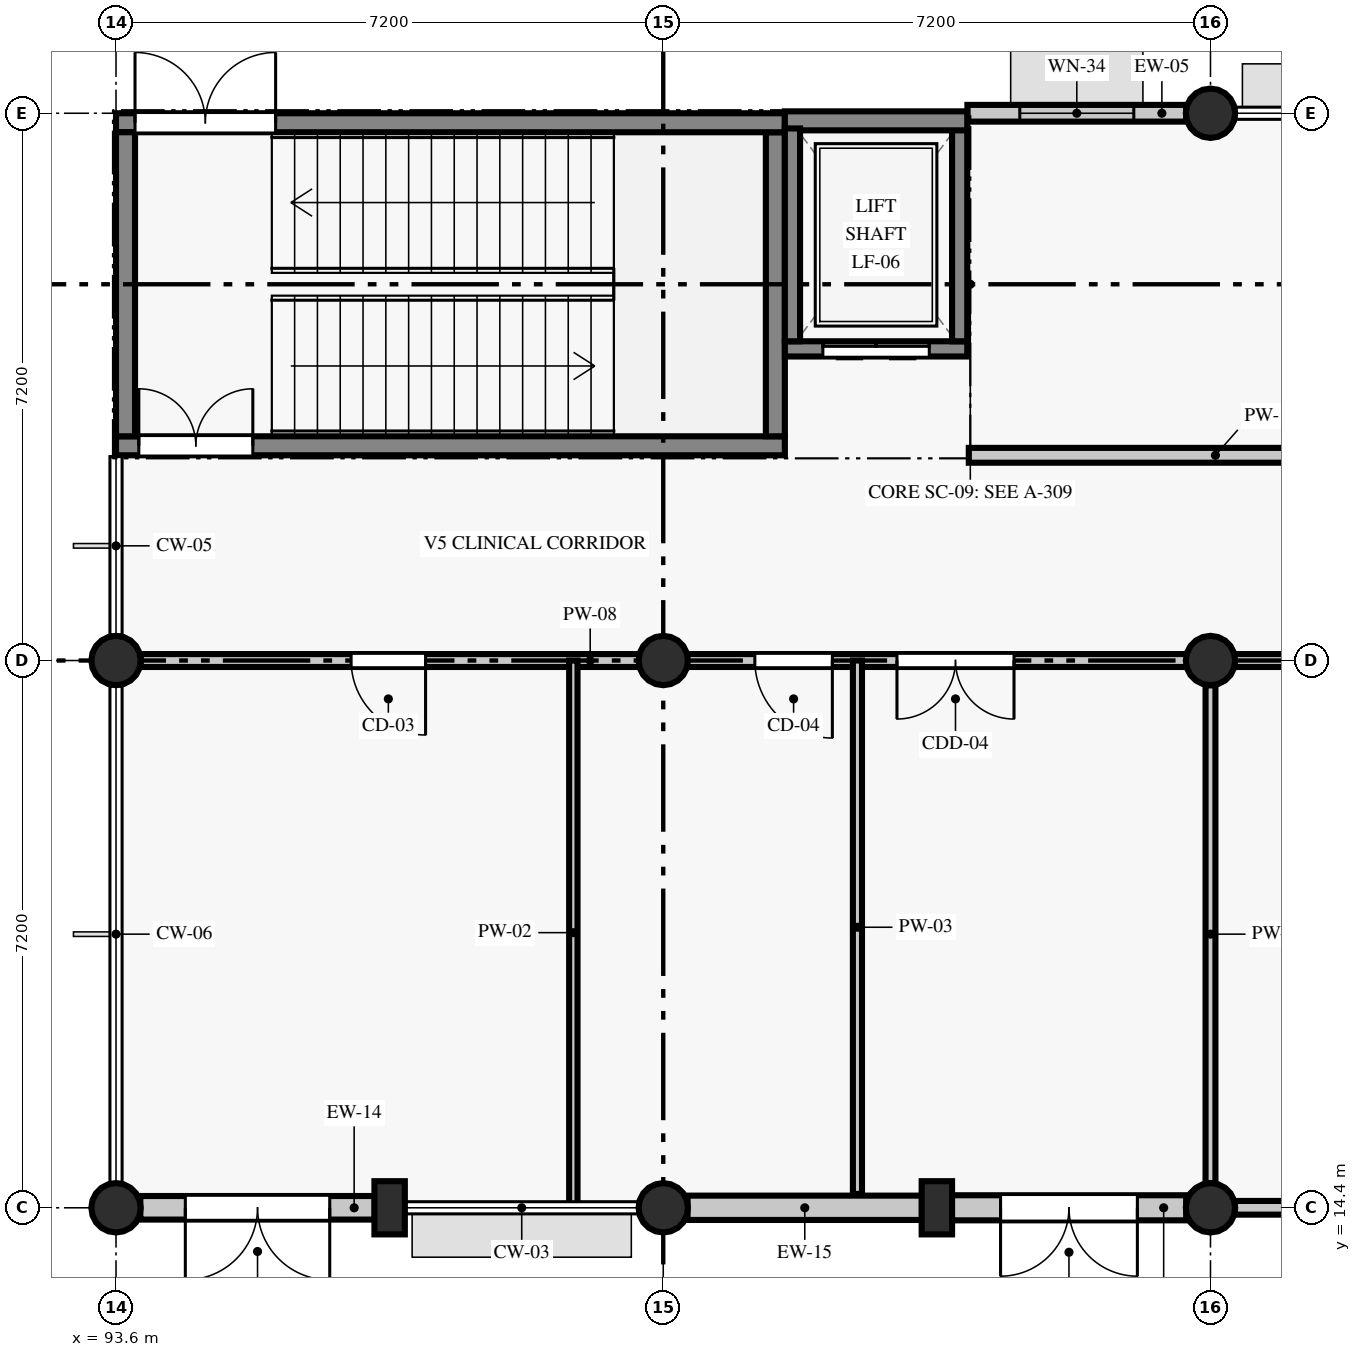
"""IFC4 building model, lengths in metres.
Left out: names, types, materials, properties, quantities, classifications, styles, units other than length and angle.
Written with IfcOpenShell. Run it as: python <this file> out.ifc"""

import sys

from ifc_helpers import new_model, si_unit, direction, frame, frame_2d, origin, origin_2d, place, context, subcontext, project, spatial, rectangle, circle, extrude, element, fill, save


model = new_model("IFC4")
c1 = context("Model", 3, precision=1e-05, world=origin(), true_north=direction((0.0, 1.0)))
c2 = subcontext(c1, "Body", "Model", "MODEL_VIEW")
j1 = project(units=[si_unit("LENGTHUNIT", "METRE"), si_unit("PLANEANGLEUNIT", "RADIAN")], contexts=[c1])
p1 = place(None, origin())
s1 = spatial("IfcSite", under=j1, at=p1, CompositionType="ELEMENT")
p2 = place(p1, origin())
s2 = spatial("IfcBuilding", under=s1, at=p2, CompositionType="ELEMENT")
p3 = place(p2, origin())
s3 = spatial("IfcBuildingStorey", under=s2, at=p3, CompositionType="ELEMENT", Elevation=0.0)
for number, where, z_axis, x_axis in (
    (1, (93.6, 14.4, 0.0), (0.0, 0.0, 1.0), (1.0, 0.0, 0.0)),
    (2, (93.6, 21.6, 0.0), (0.0, 0.0, 1.0), (1.0, 0.0, 0.0)),
    (3, (100.8, 14.4, 0.0), (0.0, 0.0, 1.0), (1.0, 0.0, 0.0)),
    (4, (100.8, 21.6, 0.0), (0.0, 0.0, 1.0), (1.0, 0.0, 0.0)),
    (5, (108.0, 14.4, 0.0), (0.0, 0.0, 1.0), (1.0, 0.0, 0.0)),
    (6, (108.0, 21.6, 0.0), (0.0, 0.0, 1.0), (1.0, 0.0, 0.0)),
    (7, (108.0, 28.8, 0.0), (0.0, 0.0, 1.0), (1.0, 0.0, 0.0)),
):
    element("IfcColumn", number, at=place(p3, frame(where, z_axis=z_axis, x_axis=x_axis)), inside=s3, PredefinedType="COLUMN", context=c2, shape_type="SweptSolid", body=[
        extrude(circle(Radius=0.325, at=origin_2d()), origin(), (0.0, 0.0, 1.0), 4.495),
    ])
for number, where, z_axis, x_axis in (
    (8, (97.2, 14.4, 0.0), (0.0, 0.0, 1.0), (1.0, 0.0, 0.0)),
    (9, (104.4, 14.4, 0.0), (0.0, 0.0, 1.0), (1.0, 0.0, 0.0)),
):
    element("IfcColumn", number, at=place(p3, frame(where, z_axis=z_axis, x_axis=x_axis)), inside=s3, PredefinedType="PILASTER", context=c2, shape_type="SweptSolid", body=[
        extrude(rectangle(XDim=0.4, YDim=0.7, at=origin_2d()), origin(), (0.0, 0.0, 1.0), 4.495),
    ])
p4 = place(p3, frame((93.92, 14.4, 0.0), z_axis=(0.0, 0.0, 1.0), x_axis=(1.0, 0.0, 0.0)))
e10 = element("IfcWall", 10, at=p4, inside=s3, PredefinedType="STANDARD", context=c2, shape_type="SweptSolid", body=[
    extrude(rectangle(XDim=3.084, YDim=0.31, at=frame_2d((1.542, 0.0))), origin(), (0.0, 0.0, 1.0), 2.9),
])
p5 = place(p4, frame((0.592, 0.0, 0.0)))
e11 = element("IfcOpeningElement", 11, at=p5, cuts=e10, PredefinedType="OPENING", context=c2, shape_type="SweptSolid", body=[
    extrude(rectangle(XDim=1.9, YDim=2.28, at=frame_2d((0.95, 1.14))), frame((0.0, 0.165, 0.0), z_axis=(0.0, -1.0, 0.0), x_axis=(1.0, 0.0, 0.0)), (0.0, 0.0, 1.0), 0.33),
])
p6 = place(p3, frame((101.12, 14.4, 0.0), z_axis=(0.0, 0.0, 1.0), x_axis=(1.0, 0.0, 0.0)))
e12 = element("IfcWall", 12, at=p6, inside=s3, PredefinedType="STANDARD", context=c2, shape_type="SweptSolid", body=[
    extrude(rectangle(XDim=3.084, YDim=0.32, at=frame_2d((1.542, 0.0))), origin(), (0.0, 0.0, 1.0), 2.9),
])
p7 = place(p3, frame((104.596, 14.4, 0.0), z_axis=(0.0, 0.0, 1.0), x_axis=(1.0, 0.0, 0.0)))
e13 = element("IfcWall", 13, at=p7, inside=s3, PredefinedType="STANDARD", context=c2, shape_type="SweptSolid", body=[
    extrude(rectangle(XDim=3.084, YDim=0.33, at=frame_2d((1.542, 0.0))), origin(), (0.0, 0.0, 1.0), 2.9),
])
p8 = place(p7, frame((0.642, 0.0, 0.0)))
e14 = element("IfcOpeningElement", 14, at=p8, cuts=e13, PredefinedType="OPENING", context=c2, shape_type="SweptSolid", body=[
    extrude(rectangle(XDim=1.8, YDim=2.25, at=frame_2d((0.9, 1.125))), frame((0.0, 0.175, 0.0), z_axis=(0.0, -1.0, 0.0), x_axis=(1.0, 0.0, 0.0)), (0.0, 0.0, 1.0), 0.35),
])
p9 = place(p3, frame((108.32, 14.4, 0.0), z_axis=(0.0, 0.0, 1.0), x_axis=(1.0, 0.0, 0.0)))
e15 = element("IfcWall", 15, at=p9, inside=s3, PredefinedType="STANDARD", context=c2, shape_type="SweptSolid", body=[
    extrude(rectangle(XDim=3.084, YDim=0.18, at=frame_2d((1.542, 0.0))), origin(), (0.0, 0.0, 1.0), 2.9),
])
p10 = place(p9, frame((0.667, 0.0, 0.0)))
e16 = element("IfcOpeningElement", 16, at=p10, cuts=e15, PredefinedType="OPENING", context=c2, shape_type="SweptSolid", body=[
    extrude(rectangle(XDim=1.75, YDim=2.22, at=frame_2d((0.875, 1.11))), frame((0.0, 0.1, 0.0), z_axis=(0.0, -1.0, 0.0), x_axis=(1.0, 0.0, 0.0)), (0.0, 0.0, 1.0), 0.2),
])
p11 = place(p3, frame((107.68, 28.8, 0.0), z_axis=(0.0, 0.0, 1.0), x_axis=(-1.0, 0.0, 0.0)))
e17 = element("IfcWall", 17, at=p11, inside=s3, PredefinedType="STANDARD", context=c2, shape_type="SweptSolid", body=[
    extrude(rectangle(XDim=2.878, YDim=0.22, at=frame_2d((1.439, 0.0))), origin(), (0.0, 0.0, 1.0), 4.495),
])
p12 = place(p11, frame((0.689, 0.0, 0.9)))
e18 = element("IfcOpeningElement", 18, at=p12, cuts=e17, PredefinedType="OPENING", context=c2, shape_type="SweptSolid", body=[
    extrude(rectangle(XDim=1.5, YDim=1.66, at=frame_2d((0.75, 0.83))), frame((0.0, 0.12, 0.0), z_axis=(0.0, -1.0, 0.0), x_axis=(1.0, 0.0, 0.0)), (0.0, 0.0, 1.0), 0.24),
])
p13 = place(p3, frame((93.6, 24.425, 0.0), z_axis=(0.0, 0.0, 1.0), x_axis=(1.0, 0.0, 0.0)))
e19 = element("IfcWall", 19, at=p13, inside=s3, PredefinedType="SHEAR", context=c2, shape_type="SweptSolid", body=[
    extrude(rectangle(XDim=8.8, YDim=0.25, at=frame_2d((4.4, 0.0))), origin(), (0.0, 0.0, 1.0), 4.495),
])
p14 = place(p13, frame((0.3, 0.0, 0.0)))
e20 = element("IfcOpeningElement", 20, at=p14, cuts=e19, PredefinedType="OPENING", context=c2, shape_type="SweptSolid", body=[
    extrude(rectangle(XDim=1.5, YDim=2.15, at=frame_2d((0.75, 1.075))), frame((0.0, 0.135, 0.0), z_axis=(0.0, -1.0, 0.0), x_axis=(1.0, 0.0, 0.0)), (0.0, 0.0, 1.0), 0.27),
])
p15 = place(p3, frame((102.275, 24.55, 0.0), z_axis=(0.0, 0.0, 1.0), x_axis=(0.0, 1.0, 0.0)))
e21 = element("IfcWall", 21, at=p15, inside=s3, PredefinedType="SHEAR", context=c2, shape_type="SweptSolid", body=[
    extrude(rectangle(XDim=4.0, YDim=0.25, at=frame_2d((2.0, 0.0))), origin(), (0.0, 0.0, 1.0), 4.495),
])
p16 = place(p3, frame((102.4, 28.675, 0.0), z_axis=(0.0, 0.0, 1.0), x_axis=(-1.0, 0.0, 0.0)))
e22 = element("IfcWall", 22, at=p16, inside=s3, PredefinedType="SHEAR", context=c2, shape_type="SweptSolid", body=[
    extrude(rectangle(XDim=8.8, YDim=0.25, at=frame_2d((4.4, 0.0))), origin(), (0.0, 0.0, 1.0), 4.495),
])
p17 = place(p16, frame((6.7, 0.0, 0.0)))
e23 = element("IfcOpeningElement", 23, at=p17, cuts=e22, PredefinedType="OPENING", context=c2, shape_type="SweptSolid", body=[
    extrude(rectangle(XDim=1.85, YDim=2.2, at=frame_2d((0.925, 1.1))), frame((0.0, 0.135, 0.0), z_axis=(0.0, -1.0, 0.0), x_axis=(1.0, 0.0, 0.0)), (0.0, 0.0, 1.0), 0.27),
])
p18 = place(p3, frame((93.725, 28.55, 0.0), z_axis=(0.0, 0.0, 1.0), x_axis=(0.0, -1.0, 0.0)))
e24 = element("IfcWall", 24, at=p18, inside=s3, PredefinedType="SHEAR", context=c2, shape_type="SweptSolid", body=[
    extrude(rectangle(XDim=4.0, YDim=0.25, at=frame_2d((2.0, 0.0))), origin(), (0.0, 0.0, 1.0), 4.495),
])
p19 = place(p3, frame((102.4, 25.7, 0.0), z_axis=(0.0, 0.0, 1.0), x_axis=(1.0, 0.0, 0.0)))
e25 = element("IfcWall", 25, at=p19, inside=s3, PredefinedType="SHEAR", context=c2, shape_type="SweptSolid", body=[
    extrude(rectangle(XDim=2.4, YDim=0.2, at=frame_2d((1.2, 0.0))), origin(), (0.0, 0.0, 1.0), 4.495),
])
p20 = place(p19, frame((0.5, 0.0, 0.0)))
e26 = element("IfcOpeningElement", 26, at=p20, cuts=e25, PredefinedType="OPENING", context=c2, shape_type="SweptSolid", body=[
    extrude(rectangle(XDim=1.4, YDim=2.15, at=frame_2d((0.7, 1.075))), frame((0.0, 0.11, 0.0), z_axis=(0.0, -1.0, 0.0), x_axis=(1.0, 0.0, 0.0)), (0.0, 0.0, 1.0), 0.22),
])
p21 = place(p3, frame((104.7, 25.8, 0.0), z_axis=(0.0, 0.0, 1.0), x_axis=(0.0, 1.0, 0.0)))
e27 = element("IfcWall", 27, at=p21, inside=s3, PredefinedType="SHEAR", context=c2, shape_type="SweptSolid", body=[
    extrude(rectangle(XDim=2.8, YDim=0.2, at=frame_2d((1.4, 0.0))), origin(), (0.0, 0.0, 1.0), 4.495),
])
p22 = place(p3, frame((104.8, 28.7, 0.0), z_axis=(0.0, 0.0, 1.0), x_axis=(-1.0, 0.0, 0.0)))
e28 = element("IfcWall", 28, at=p22, inside=s3, PredefinedType="SHEAR", context=c2, shape_type="SweptSolid", body=[
    extrude(rectangle(XDim=2.4, YDim=0.25, at=frame_2d((1.2, 0.0))), origin(), (0.0, 0.0, 1.0), 4.495),
])
p23 = place(p3, frame((102.5, 28.6, 0.0), z_axis=(0.0, 0.0, 1.0), x_axis=(0.0, -1.0, 0.0)))
e29 = element("IfcWall", 29, at=p23, inside=s3, PredefinedType="SHEAR", context=c2, shape_type="SweptSolid", body=[
    extrude(rectangle(XDim=2.8, YDim=0.2, at=frame_2d((1.4, 0.0))), origin(), (0.0, 0.0, 1.0), 4.495),
])
p24 = place(p3, frame((93.925, 21.6, 0.0), z_axis=(0.0, 0.0, 1.0), x_axis=(1.0, 0.0, 0.0)))
e30 = element("IfcWall", 30, at=p24, inside=s3, PredefinedType="PARTITIONING", context=c2, shape_type="SweptSolid", body=[
    extrude(rectangle(XDim=28.15, YDim=0.17, at=frame_2d((14.075, 0.0))), origin(), (0.0, 0.0, 1.0), 3.795),
])
p25 = place(p24, frame((2.768, 0.0, 0.0)))
e31 = element("IfcOpeningElement", 31, at=p25, cuts=e30, PredefinedType="OPENING", context=c2, shape_type="SweptSolid", body=[
    extrude(rectangle(XDim=0.98, YDim=2.08, at=frame_2d((0.49, 1.04))), frame((0.0, 0.095, 0.0), z_axis=(0.0, -1.0, 0.0), x_axis=(1.0, 0.0, 0.0)), (0.0, 0.0, 1.0), 0.19),
])
p26 = place(p24, frame((8.08, 0.0, 0.0)))
e32 = element("IfcOpeningElement", 32, at=p26, cuts=e30, PredefinedType="OPENING", context=c2, shape_type="SweptSolid", body=[
    extrude(rectangle(XDim=1.02, YDim=2.08, at=frame_2d((0.51, 1.04))), frame((0.0, 0.095, 0.0), z_axis=(0.0, -1.0, 0.0), x_axis=(1.0, 0.0, 0.0)), (0.0, 0.0, 1.0), 0.19),
])
p27 = place(p24, frame((9.95, 0.0, 0.0)))
e33 = element("IfcOpeningElement", 33, at=p27, cuts=e30, PredefinedType="OPENING", context=c2, shape_type="SweptSolid", body=[
    extrude(rectangle(XDim=1.54, YDim=2.2, at=frame_2d((0.77, 1.1))), frame((0.0, 0.095, 0.0), z_axis=(0.0, -1.0, 0.0), x_axis=(1.0, 0.0, 0.0)), (0.0, 0.0, 1.0), 0.19),
])
p28 = place(p24, frame((15.055, 0.0, 0.0)))
e34 = element("IfcOpeningElement", 34, at=p28, cuts=e30, PredefinedType="OPENING", context=c2, shape_type="SweptSolid", body=[
    extrude(rectangle(XDim=0.92, YDim=2.18, at=frame_2d((0.46, 1.09))), frame((0.0, 0.095, 0.0), z_axis=(0.0, -1.0, 0.0), x_axis=(1.0, 0.0, 0.0)), (0.0, 0.0, 1.0), 0.19),
])
p29 = place(p24, frame((17.255, 0.0, 0.0)))
e35 = element("IfcOpeningElement", 35, at=p29, cuts=e30, PredefinedType="OPENING", context=c2, shape_type="SweptSolid", body=[
    extrude(rectangle(XDim=0.94, YDim=2.08, at=frame_2d((0.47, 1.04))), frame((0.0, 0.095, 0.0), z_axis=(0.0, -1.0, 0.0), x_axis=(1.0, 0.0, 0.0)), (0.0, 0.0, 1.0), 0.19),
])
p30 = place(p24, frame((19.545, 0.0, 0.0)))
e36 = element("IfcOpeningElement", 36, at=p30, cuts=e30, PredefinedType="OPENING", context=c2, shape_type="SweptSolid", body=[
    extrude(rectangle(XDim=0.9, YDim=2.08, at=frame_2d((0.45, 1.04))), frame((0.0, 0.095, 0.0), z_axis=(0.0, -1.0, 0.0), x_axis=(1.0, 0.0, 0.0)), (0.0, 0.0, 1.0), 0.19),
])
p31 = place(p24, frame((23.11, 0.0, 0.0)))
e37 = element("IfcOpeningElement", 37, at=p31, cuts=e30, PredefinedType="OPENING", context=c2, shape_type="SweptSolid", body=[
    extrude(rectangle(XDim=0.95, YDim=2.13, at=frame_2d((0.475, 1.065))), frame((0.0, 0.095, 0.0), z_axis=(0.0, -1.0, 0.0), x_axis=(1.0, 0.0, 0.0)), (0.0, 0.0, 1.0), 0.19),
])
p32 = place(p24, frame((24.765, 0.0, 0.0)))
e38 = element("IfcOpeningElement", 38, at=p32, cuts=e30, PredefinedType="OPENING", context=c2, shape_type="SweptSolid", body=[
    extrude(rectangle(XDim=1.0, YDim=2.13, at=frame_2d((0.5, 1.065))), frame((0.0, 0.095, 0.0), z_axis=(0.0, -1.0, 0.0), x_axis=(1.0, 0.0, 0.0)), (0.0, 0.0, 1.0), 0.19),
])
p33 = place(p3, frame((99.617, 14.44, 0.0), z_axis=(0.0, 0.0, 1.0), x_axis=(0.0, 1.0, 0.0)))
e39 = element("IfcWall", 39, at=p33, inside=s3, PredefinedType="PARTITIONING", context=c2, shape_type="SweptSolid", body=[
    extrude(rectangle(XDim=7.16, YDim=0.11, at=frame_2d((3.58, 0.0))), origin(), (0.0, 0.0, 1.0), 3.795),
])
p34 = place(p3, frame((103.355, 14.582, 0.0), z_axis=(0.0, 0.0, 1.0), x_axis=(0.0, 1.0, 0.0)))
e40 = element("IfcWall", 40, at=p34, inside=s3, PredefinedType="PARTITIONING", context=c2, shape_type="SweptSolid", body=[
    extrude(rectangle(XDim=7.018, YDim=0.12, at=frame_2d((3.509, 0.0))), origin(), (0.0, 0.0, 1.0), 3.795),
])
p35 = place(p3, frame((108.0, 14.725, 0.0), z_axis=(0.0, 0.0, 1.0), x_axis=(0.0, 1.0, 0.0)))
e41 = element("IfcWall", 41, at=p35, inside=s3, PredefinedType="PARTITIONING", context=c2, shape_type="SweptSolid", body=[
    extrude(rectangle(XDim=6.55, YDim=0.13, at=frame_2d((3.275, 0.0))), origin(), (0.0, 0.0, 1.0), 3.945),
])
p36 = place(p3, frame((104.82, 24.3, 0.0), z_axis=(0.0, 0.0, 1.0), x_axis=(1.0, 0.0, 0.0)))
e42 = element("IfcWall", 42, at=p36, inside=s3, PredefinedType="PARTITIONING", context=c2, shape_type="SweptSolid", body=[
    extrude(rectangle(XDim=8.76, YDim=0.195, at=frame_2d((4.38, 0.0))), origin(), (0.0, 0.0, 1.0), 3.945),
])
p37 = place(p36, frame((6.54, 0.0, 0.0)))
e43 = element("IfcOpeningElement", 43, at=p37, cuts=e42, PredefinedType="OPENING", context=c2, shape_type="SweptSolid", body=[
    extrude(rectangle(XDim=1.05, YDim=2.13, at=frame_2d((0.525, 1.065))), frame((0.0, 0.107, 0.0), z_axis=(0.0, -1.0, 0.0), x_axis=(1.0, 0.0, 0.0)), (0.0, 0.0, 1.0), 0.215),
])
p38 = place(p5, frame((1.9, 0.0, 0.0), z_axis=(0.0, 0.0, 1.0), x_axis=(-1.0, 0.0, 0.0)))
e44 = element("IfcDoor", 44, at=p38, inside=s3, OperationType="DOUBLE_DOOR_SINGLE_SWING", PredefinedType="DOOR", context=c2, shape_type="SweptSolid", body=[
    extrude(rectangle(XDim=1.9, YDim=2.28, at=frame_2d((0.95, 1.14))), frame((0.0, 0.025, 0.0), z_axis=(0.0, -1.0, 0.0), x_axis=(1.0, 0.0, 0.0)), (0.0, 0.0, 1.0), 0.05),
])
fill(e11, e44)
p39 = place(p8, frame((1.8, 0.0, 0.0), z_axis=(0.0, 0.0, 1.0), x_axis=(-1.0, 0.0, 0.0)))
e45 = element("IfcDoor", 45, at=p39, inside=s3, OperationType="DOUBLE_DOOR_SINGLE_SWING", PredefinedType="DOOR", context=c2, shape_type="SweptSolid", body=[
    extrude(rectangle(XDim=1.8, YDim=2.25, at=frame_2d((0.9, 1.125))), frame((0.0, 0.025, 0.0), z_axis=(0.0, -1.0, 0.0), x_axis=(1.0, 0.0, 0.0)), (0.0, 0.0, 1.0), 0.05),
])
fill(e14, e45)
p40 = place(p12, origin())
e46 = element("IfcWindow", 46, at=p40, inside=s3, PartitioningType="SINGLE_PANEL", PredefinedType="WINDOW", context=c2, shape_type="SweptSolid", body=[
    extrude(rectangle(XDim=1.5, YDim=1.66, at=frame_2d((0.75, 0.83))), frame((0.0, 0.03, 0.0), z_axis=(0.0, -1.0, 0.0), x_axis=(1.0, 0.0, 0.0)), (0.0, 0.0, 1.0), 0.06),
])
fill(e18, e46)
p41 = place(p14, origin())
e47 = element("IfcDoor", 47, at=p41, inside=s3, OperationType="DOUBLE_DOOR_SINGLE_SWING", PredefinedType="DOOR", context=c2, shape_type="SweptSolid", body=[
    extrude(rectangle(XDim=1.5, YDim=2.15, at=frame_2d((0.75, 1.075))), frame((0.0, 0.025, 0.0), z_axis=(0.0, -1.0, 0.0), x_axis=(1.0, 0.0, 0.0)), (0.0, 0.0, 1.0), 0.05),
])
fill(e20, e47)
p42 = place(p17, frame((1.85, 0.0, 0.0), z_axis=(0.0, 0.0, 1.0), x_axis=(-1.0, 0.0, 0.0)))
e48 = element("IfcDoor", 48, at=p42, inside=s3, OperationType="DOUBLE_DOOR_SINGLE_SWING", PredefinedType="DOOR", context=c2, shape_type="SweptSolid", body=[
    extrude(rectangle(XDim=1.85, YDim=2.2, at=frame_2d((0.925, 1.1))), frame((0.0, 0.025, 0.0), z_axis=(0.0, -1.0, 0.0), x_axis=(1.0, 0.0, 0.0)), (0.0, 0.0, 1.0), 0.05),
])
fill(e23, e48)
p43 = place(p20, frame((1.4, 0.0, 0.0), z_axis=(0.0, 0.0, 1.0), x_axis=(-1.0, 0.0, 0.0)))
e49 = element("IfcDoor", 49, at=p43, inside=s3, OperationType="DOUBLE_DOOR_SLIDING", PredefinedType="DOOR", context=c2, shape_type="SweptSolid", body=[
    extrude(rectangle(XDim=1.4, YDim=2.15, at=frame_2d((0.7, 1.075))), frame((0.0, 0.025, 0.0), z_axis=(0.0, -1.0, 0.0), x_axis=(1.0, 0.0, 0.0)), (0.0, 0.0, 1.0), 0.05),
])
fill(e26, e49)
p44 = place(p25, frame((0.98, 0.0, 0.0), z_axis=(0.0, 0.0, 1.0), x_axis=(-1.0, 0.0, 0.0)))
e50 = element("IfcDoor", 50, at=p44, inside=s3, OperationType="SINGLE_SWING_LEFT", PredefinedType="DOOR", context=c2, shape_type="SweptSolid", body=[
    extrude(rectangle(XDim=0.98, YDim=2.08, at=frame_2d((0.49, 1.04))), frame((0.0, 0.025, 0.0), z_axis=(0.0, -1.0, 0.0), x_axis=(1.0, 0.0, 0.0)), (0.0, 0.0, 1.0), 0.05),
])
fill(e31, e50)
p45 = place(p26, frame((1.02, 0.0, 0.0), z_axis=(0.0, 0.0, 1.0), x_axis=(-1.0, 0.0, 0.0)))
e51 = element("IfcDoor", 51, at=p45, inside=s3, OperationType="SINGLE_SWING_LEFT", PredefinedType="DOOR", context=c2, shape_type="SweptSolid", body=[
    extrude(rectangle(XDim=1.02, YDim=2.08, at=frame_2d((0.51, 1.04))), frame((0.0, 0.025, 0.0), z_axis=(0.0, -1.0, 0.0), x_axis=(1.0, 0.0, 0.0)), (0.0, 0.0, 1.0), 0.05),
])
fill(e32, e51)
p46 = place(p27, frame((1.54, 0.0, 0.0), z_axis=(0.0, 0.0, 1.0), x_axis=(-1.0, 0.0, 0.0)))
e52 = element("IfcDoor", 52, at=p46, inside=s3, OperationType="DOUBLE_DOOR_SINGLE_SWING", PredefinedType="DOOR", context=c2, shape_type="SweptSolid", body=[
    extrude(rectangle(XDim=1.54, YDim=2.2, at=frame_2d((0.77, 1.1))), frame((0.0, 0.025, 0.0), z_axis=(0.0, -1.0, 0.0), x_axis=(1.0, 0.0, 0.0)), (0.0, 0.0, 1.0), 0.05),
])
fill(e33, e52)
save(model, sys.argv[1])
